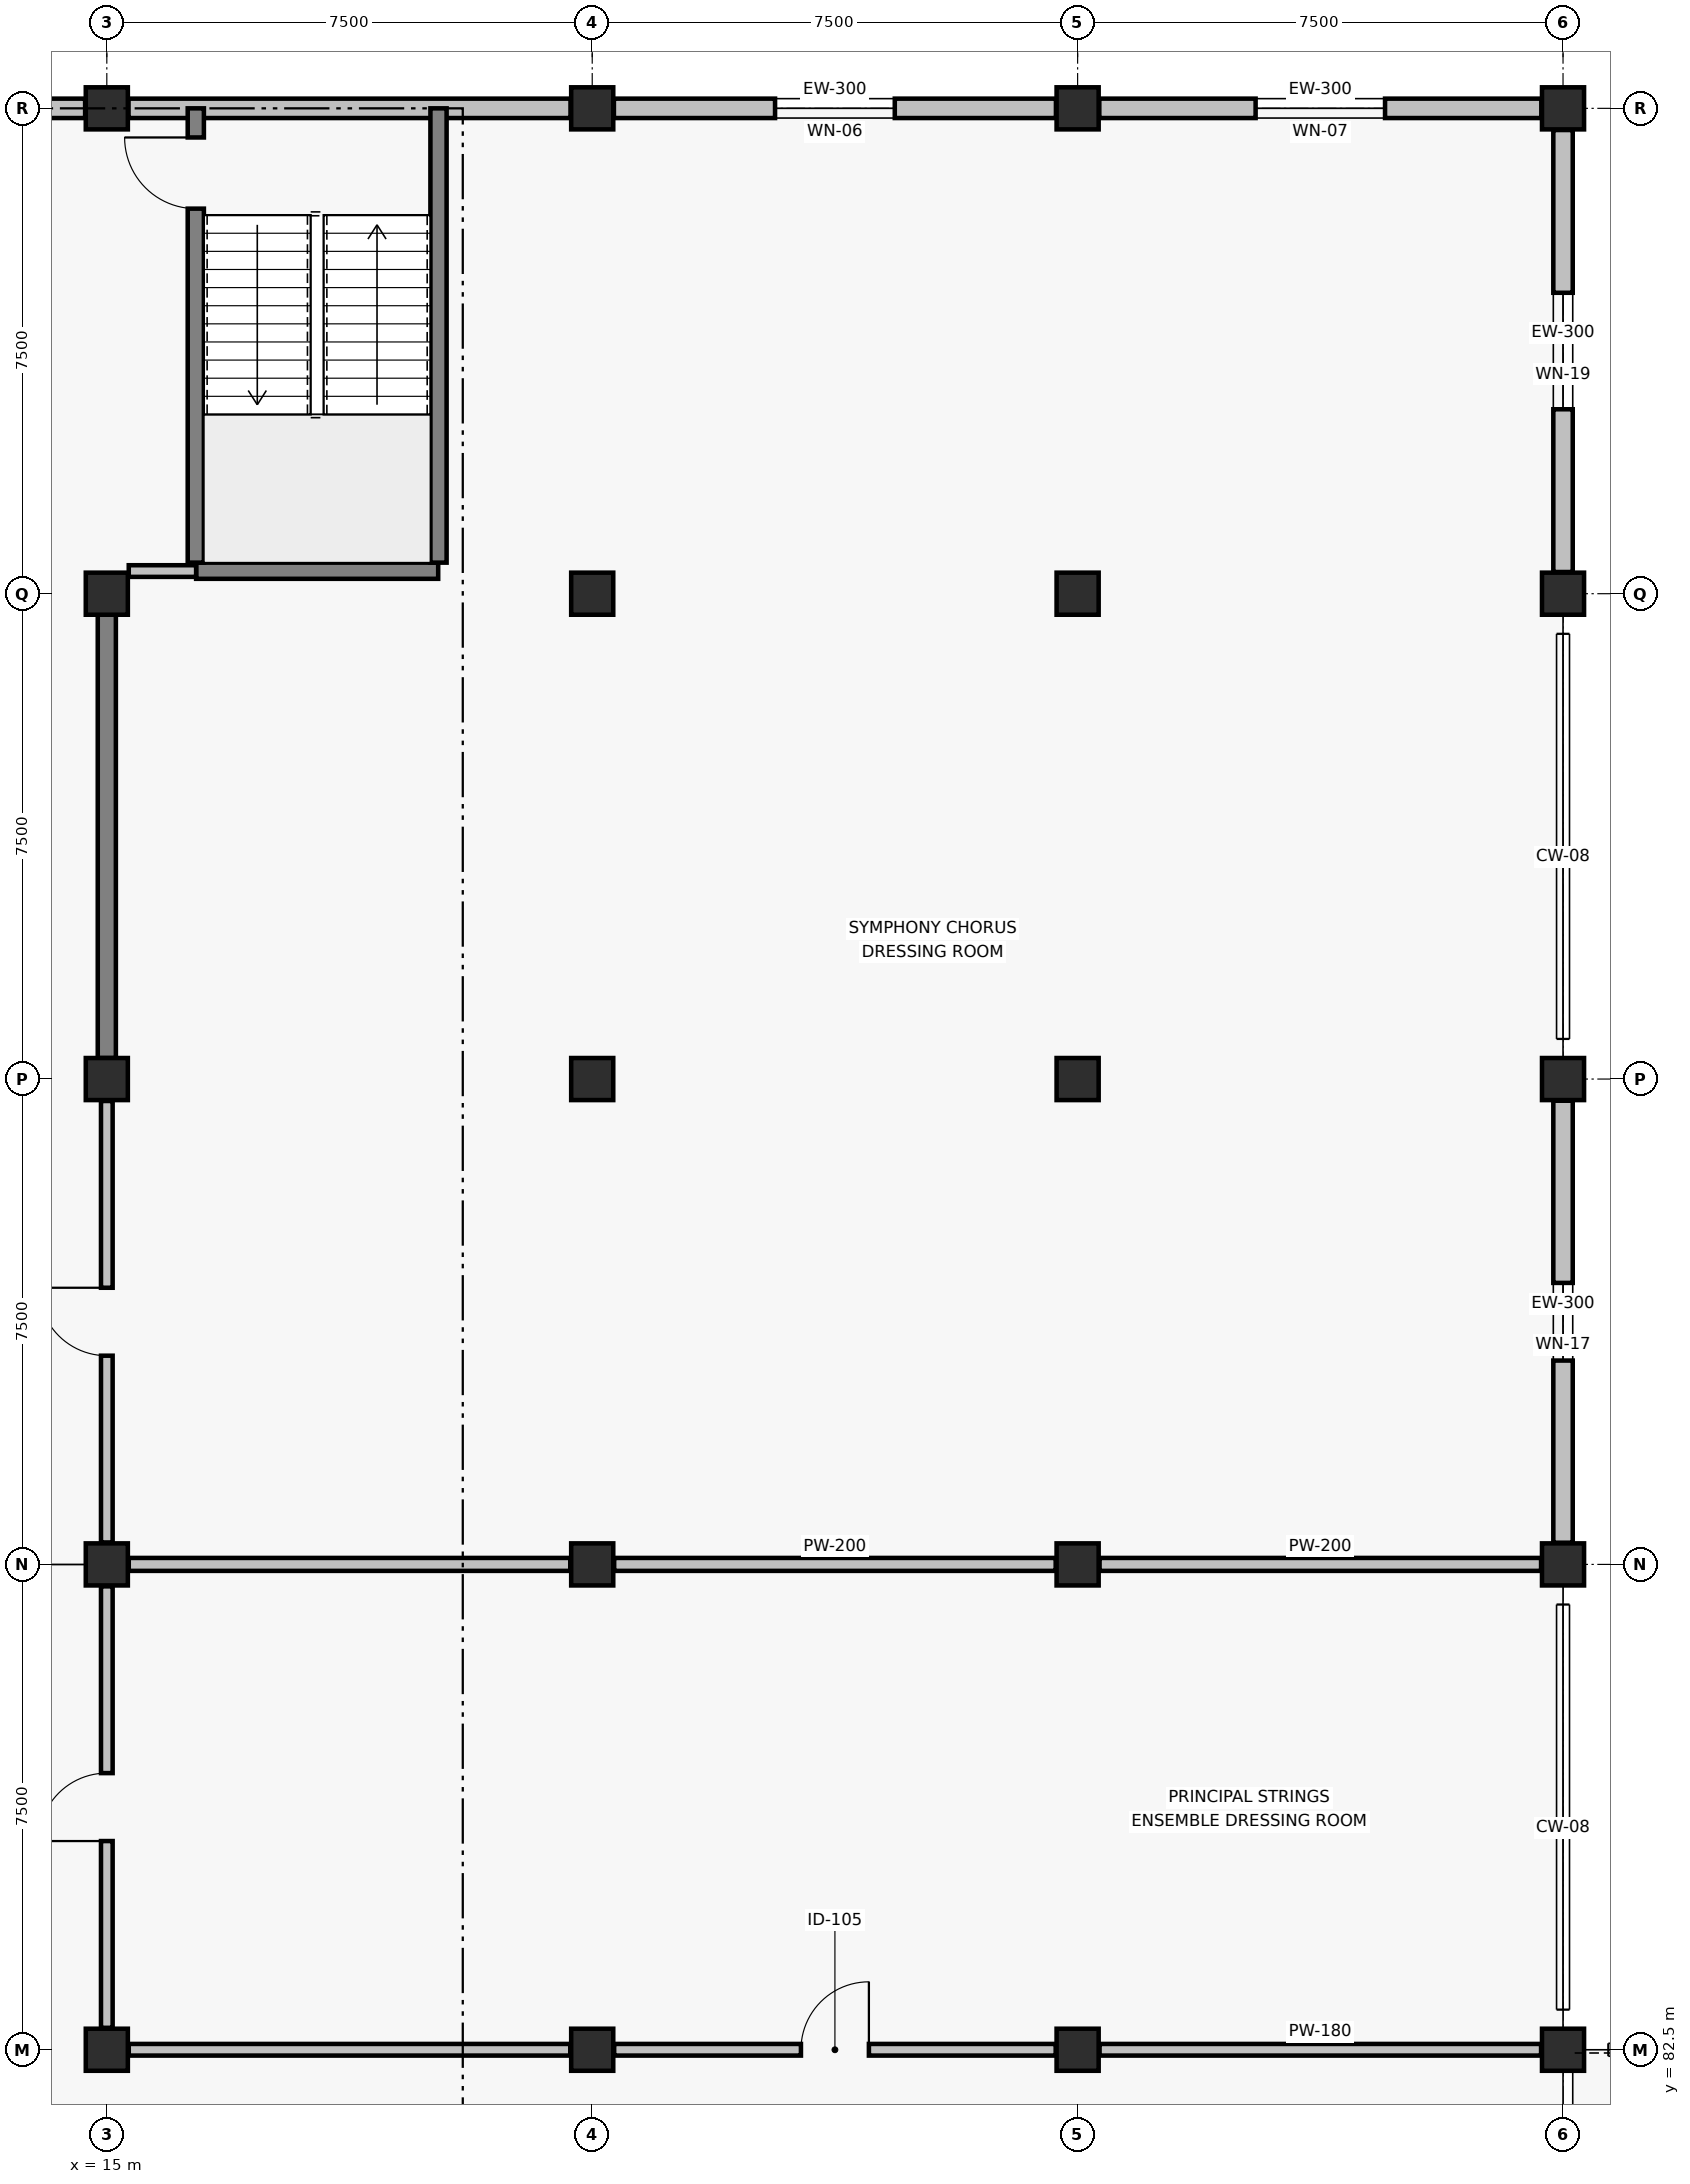
"""IFC4 building model, lengths in metres.
Left out: names, types, materials, properties, quantities, classifications, styles, units other than length and angle.
Written with IfcOpenShell. Run it as: python <this file> out.ifc"""

import sys

from ifc_helpers import new_model, si_unit, direction, frame, frame_2d, origin, origin_2d, place, context, subcontext, project, spatial, rectangle, extrude, element, fill, save


model = new_model("IFC4")
c1 = context("Model", 3, precision=1e-05, world=origin(), true_north=direction((0.0, 1.0)))
c2 = subcontext(c1, "Body", "Model", "MODEL_VIEW")
j1 = project(units=[si_unit("LENGTHUNIT", "METRE"), si_unit("PLANEANGLEUNIT", "RADIAN")], contexts=[c1])
p1 = place(None, origin())
s1 = spatial("IfcSite", under=j1, at=p1, CompositionType="ELEMENT")
p2 = place(p1, origin())
s2 = spatial("IfcBuilding", under=s1, at=p2, CompositionType="ELEMENT")
p3 = place(p2, frame((0.0, 0.0, 4.8)))
s3 = spatial("IfcBuildingStorey", under=s2, at=p3, CompositionType="ELEMENT", Elevation=4.8)
for number, where, z_axis, x_axis in (
    (1, (15.0, 82.5, 0.0), (0.0, 0.0, 1.0), (1.0, 0.0, 0.0)),
    (2, (15.0, 90.0, 0.0), (0.0, 0.0, 1.0), (1.0, 0.0, 0.0)),
    (3, (15.0, 97.5, 0.0), (0.0, 0.0, 1.0), (1.0, 0.0, 0.0)),
    (4, (15.0, 105.0, 0.0), (0.0, 0.0, 1.0), (1.0, 0.0, 0.0)),
    (5, (15.0, 112.5, 0.0), (0.0, 0.0, 1.0), (1.0, 0.0, 0.0)),
    (6, (22.5, 82.5, 0.0), (0.0, 0.0, 1.0), (1.0, 0.0, 0.0)),
    (7, (22.5, 90.0, 0.0), (0.0, 0.0, 1.0), (1.0, 0.0, 0.0)),
    (8, (22.5, 97.5, 0.0), (0.0, 0.0, 1.0), (1.0, 0.0, 0.0)),
    (9, (22.5, 105.0, 0.0), (0.0, 0.0, 1.0), (1.0, 0.0, 0.0)),
    (10, (22.5, 112.5, 0.0), (0.0, 0.0, 1.0), (1.0, 0.0, 0.0)),
    (11, (30.0, 82.5, 0.0), (0.0, 0.0, 1.0), (1.0, 0.0, 0.0)),
    (12, (30.0, 90.0, 0.0), (0.0, 0.0, 1.0), (1.0, 0.0, 0.0)),
    (13, (30.0, 97.5, 0.0), (0.0, 0.0, 1.0), (1.0, 0.0, 0.0)),
    (14, (30.0, 105.0, 0.0), (0.0, 0.0, 1.0), (1.0, 0.0, 0.0)),
    (15, (30.0, 112.5, 0.0), (0.0, 0.0, 1.0), (1.0, 0.0, 0.0)),
    (16, (37.5, 82.5, 0.0), (0.0, 0.0, 1.0), (1.0, 0.0, 0.0)),
    (17, (37.5, 90.0, 0.0), (0.0, 0.0, 1.0), (1.0, 0.0, 0.0)),
    (18, (37.5, 97.5, 0.0), (0.0, 0.0, 1.0), (1.0, 0.0, 0.0)),
    (19, (37.5, 105.0, 0.0), (0.0, 0.0, 1.0), (1.0, 0.0, 0.0)),
    (20, (37.5, 112.5, 0.0), (0.0, 0.0, 1.0), (1.0, 0.0, 0.0)),
):
    element("IfcColumn", number, at=place(p3, frame(where, z_axis=z_axis, x_axis=x_axis)), inside=s3, PredefinedType="COLUMN", context=c2, shape_type="SweptSolid", body=[
        extrude(rectangle(XDim=0.65, YDim=0.65, at=origin_2d()), origin(), (0.0, 0.0, 1.0), 4.2),
    ])
p4 = place(p3, frame((15.0, 97.825, 0.0), z_axis=(0.0, 0.0, 1.0), x_axis=(0.0, 1.0, 0.0)))
e21 = element("IfcWall", 21, at=p4, inside=s3, PredefinedType="SHEAR", context=c2, shape_type="SweptSolid", body=[
    extrude(rectangle(XDim=6.85, YDim=0.28, at=frame_2d((3.425, 0.0))), origin(), (0.0, 0.0, 1.0), 3.9),
])
p5 = place(p3, frame((8.12, 112.5, 0.0), z_axis=(0.0, 0.0, 1.0), x_axis=(1.0, 0.0, 0.0)))
e22 = element("IfcWall", 22, at=p5, inside=s3, PredefinedType="SOLIDWALL", context=c2, shape_type="SweptSolid", body=[
    extrude(rectangle(XDim=6.545, YDim=0.3, at=frame_2d((3.272, 0.0))), origin(), (0.0, 0.0, 1.0), 2.89),
])
p6 = place(p5, frame((2.355, 0.0, 0.6)))
e23 = element("IfcOpeningElement", 23, at=p6, cuts=e22, PredefinedType="OPENING", context=c2, shape_type="SweptSolid", body=[
    extrude(rectangle(XDim=1.55, YDim=1.8, at=frame_2d((0.775, 0.9))), frame((0.0, 0.16, 0.0), z_axis=(0.0, -1.0, 0.0), x_axis=(1.0, 0.0, 0.0)), (0.0, 0.0, 1.0), 0.32),
])
p7 = place(p3, frame((15.335, 112.5, 0.0), z_axis=(0.0, 0.0, 1.0), x_axis=(1.0, 0.0, 0.0)))
e24 = element("IfcWall", 24, at=p7, inside=s3, PredefinedType="SOLIDWALL", context=c2, shape_type="SweptSolid", body=[
    extrude(rectangle(XDim=6.83, YDim=0.3, at=frame_2d((3.415, 0.0))), origin(), (0.0, 0.0, 1.0), 2.89),
])
p8 = place(p3, frame((22.835, 112.5, 0.0), z_axis=(0.0, 0.0, 1.0), x_axis=(1.0, 0.0, 0.0)))
e25 = element("IfcWall", 25, at=p8, inside=s3, PredefinedType="SOLIDWALL", context=c2, shape_type="SweptSolid", body=[
    extrude(rectangle(XDim=6.83, YDim=0.3, at=frame_2d((3.415, 0.0))), origin(), (0.0, 0.0, 1.0), 3.14),
])
p9 = place(p8, frame((2.49, 0.0, 0.6)))
e26 = element("IfcOpeningElement", 26, at=p9, cuts=e25, PredefinedType="OPENING", context=c2, shape_type="SweptSolid", body=[
    extrude(rectangle(XDim=1.85, YDim=1.8, at=frame_2d((0.925, 0.9))), frame((0.0, 0.16, 0.0), z_axis=(0.0, -1.0, 0.0), x_axis=(1.0, 0.0, 0.0)), (0.0, 0.0, 1.0), 0.32),
])
p10 = place(p3, frame((30.335, 112.5, 0.0), z_axis=(0.0, 0.0, 1.0), x_axis=(1.0, 0.0, 0.0)))
e27 = element("IfcWall", 27, at=p10, inside=s3, PredefinedType="SOLIDWALL", context=c2, shape_type="SweptSolid", body=[
    extrude(rectangle(XDim=6.83, YDim=0.3, at=frame_2d((3.415, 0.0))), origin(), (0.0, 0.0, 1.0), 3.14),
])
p11 = place(p10, frame((2.415, 0.0, 0.6)))
e28 = element("IfcOpeningElement", 28, at=p11, cuts=e27, PredefinedType="OPENING", context=c2, shape_type="SweptSolid", body=[
    extrude(rectangle(XDim=2.0, YDim=1.45, at=frame_2d((1.0, 0.725))), frame((0.0, 0.16, 0.0), z_axis=(0.0, -1.0, 0.0), x_axis=(1.0, 0.0, 0.0)), (0.0, 0.0, 1.0), 0.32),
])
p12 = place(p3, frame((37.5, 90.335, 0.0), z_axis=(0.0, 0.0, 1.0), x_axis=(0.0, 1.0, 0.0)))
e29 = element("IfcWall", 29, at=p12, inside=s3, PredefinedType="SOLIDWALL", context=c2, shape_type="SweptSolid", body=[
    extrude(rectangle(XDim=6.83, YDim=0.3, at=frame_2d((3.415, 0.0))), origin(), (0.0, 0.0, 1.0), 2.84),
])
p13 = place(p12, frame((2.815, 0.0, 0.6)))
e30 = element("IfcOpeningElement", 30, at=p13, cuts=e29, PredefinedType="OPENING", context=c2, shape_type="SweptSolid", body=[
    extrude(rectangle(XDim=1.2, YDim=1.2, at=frame_2d((0.6, 0.6))), frame((0.0, 0.16, 0.0), z_axis=(0.0, -1.0, 0.0), x_axis=(1.0, 0.0, 0.0)), (0.0, 0.0, 1.0), 0.32),
])
p14 = place(p3, frame((37.5, 105.335, 0.0), z_axis=(0.0, 0.0, 1.0), x_axis=(0.0, 1.0, 0.0)))
e31 = element("IfcWall", 31, at=p14, inside=s3, PredefinedType="SOLIDWALL", context=c2, shape_type="SweptSolid", body=[
    extrude(rectangle(XDim=6.83, YDim=0.3, at=frame_2d((3.415, 0.0))), origin(), (0.0, 0.0, 1.0), 2.94),
])
p15 = place(p14, frame((2.515, 0.0, 0.6)))
e32 = element("IfcOpeningElement", 32, at=p15, cuts=e31, PredefinedType="OPENING", context=c2, shape_type="SweptSolid", body=[
    extrude(rectangle(XDim=1.8, YDim=1.2, at=frame_2d((0.9, 0.6))), frame((0.0, 0.16, 0.0), z_axis=(0.0, -1.0, 0.0), x_axis=(1.0, 0.0, 0.0)), (0.0, 0.0, 1.0), 0.32),
])
p16 = place(p3, frame((16.38, 105.355, 0.0), z_axis=(0.0, 0.0, 1.0), x_axis=(1.0, 0.0, 0.0)))
e33 = element("IfcWall", 33, at=p16, inside=s3, PredefinedType="SOLIDWALL", context=c2, shape_type="SweptSolid", body=[
    extrude(rectangle(XDim=3.74, YDim=0.25, at=frame_2d((1.87, 0.0))), origin(), (0.0, 0.0, 1.0), 3.92),
])
p17 = place(p3, frame((16.375, 105.48, 0.0), z_axis=(0.0, 0.0, 1.0), x_axis=(0.0, 1.0, 0.0)))
e34 = element("IfcWall", 34, at=p17, inside=s3, PredefinedType="SOLIDWALL", context=c2, shape_type="SweptSolid", body=[
    extrude(rectangle(XDim=7.02, YDim=0.25, at=frame_2d((3.51, 0.0))), origin(), (0.0, 0.0, 1.0), 3.92),
])
p18 = place(p17, frame((5.47, 0.0, 0.0)))
e35 = element("IfcOpeningElement", 35, at=p18, cuts=e34, PredefinedType="OPENING", context=c2, shape_type="SweptSolid", body=[
    extrude(rectangle(XDim=1.1, YDim=2.15, at=frame_2d((0.55, 1.075))), frame((0.0, 0.135, 0.0), z_axis=(0.0, -1.0, 0.0), x_axis=(1.0, 0.0, 0.0)), (0.0, 0.0, 1.0), 0.27),
])
p19 = place(p3, frame((20.125, 105.48, 0.0), z_axis=(0.0, 0.0, 1.0), x_axis=(0.0, 1.0, 0.0)))
e36 = element("IfcWall", 36, at=p19, inside=s3, PredefinedType="SOLIDWALL", context=c2, shape_type="SweptSolid", body=[
    extrude(rectangle(XDim=7.02, YDim=0.25, at=frame_2d((3.51, 0.0))), origin(), (0.0, 0.0, 1.0), 3.92),
])
p20 = place(p3, frame((15.339, 105.35, 0.0), z_axis=(0.0, 0.0, 1.0), x_axis=(1.0, 0.0, 0.0)))
e37 = element("IfcWall", 37, at=p20, inside=s3, PredefinedType="PARTITIONING", context=c2, shape_type="SweptSolid", body=[
    extrude(rectangle(XDim=1.041, YDim=0.18, at=frame_2d((0.521, 0.0))), origin(), (0.0, 0.0, 1.0), 2.89),
])
p21 = place(p3, frame((15.339, 82.5, 0.0), z_axis=(0.0, 0.0, 1.0), x_axis=(1.0, 0.0, 0.0)))
e38 = element("IfcWall", 38, at=p21, inside=s3, PredefinedType="PARTITIONING", context=c2, shape_type="SweptSolid", body=[
    extrude(rectangle(XDim=6.822, YDim=0.18, at=frame_2d((3.411, 0.0))), origin(), (0.0, 0.0, 1.0), 2.84),
])
p22 = place(p3, frame((22.839, 82.5, 0.0), z_axis=(0.0, 0.0, 1.0), x_axis=(1.0, 0.0, 0.0)))
e39 = element("IfcWall", 39, at=p22, inside=s3, PredefinedType="PARTITIONING", context=c2, shape_type="SweptSolid", body=[
    extrude(rectangle(XDim=6.822, YDim=0.18, at=frame_2d((3.411, 0.0))), origin(), (0.0, 0.0, 1.0), 2.84),
])
p23 = place(p22, frame((2.886, 0.0, 0.0)))
e40 = element("IfcOpeningElement", 40, at=p23, cuts=e39, PredefinedType="OPENING", context=c2, shape_type="SweptSolid", body=[
    extrude(rectangle(XDim=1.05, YDim=2.12, at=frame_2d((0.525, 1.06))), frame((0.0, 0.1, 0.0), z_axis=(0.0, -1.0, 0.0), x_axis=(1.0, 0.0, 0.0)), (0.0, 0.0, 1.0), 0.2),
])
p24 = place(p3, frame((30.339, 82.5, 0.0), z_axis=(0.0, 0.0, 1.0), x_axis=(1.0, 0.0, 0.0)))
e41 = element("IfcWall", 41, at=p24, inside=s3, PredefinedType="PARTITIONING", context=c2, shape_type="SweptSolid", body=[
    extrude(rectangle(XDim=6.822, YDim=0.18, at=frame_2d((3.411, 0.0))), origin(), (0.0, 0.0, 1.0), 3.04),
])
p25 = place(p3, frame((15.339, 90.0, 0.0), z_axis=(0.0, 0.0, 1.0), x_axis=(1.0, 0.0, 0.0)))
e42 = element("IfcWall", 42, at=p25, inside=s3, PredefinedType="PARTITIONING", context=c2, shape_type="SweptSolid", body=[
    extrude(rectangle(XDim=6.822, YDim=0.2, at=frame_2d((3.411, 0.0))), origin(), (0.0, 0.0, 1.0), 2.89),
])
p26 = place(p3, frame((22.839, 90.0, 0.0), z_axis=(0.0, 0.0, 1.0), x_axis=(1.0, 0.0, 0.0)))
e43 = element("IfcWall", 43, at=p26, inside=s3, PredefinedType="PARTITIONING", context=c2, shape_type="SweptSolid", body=[
    extrude(rectangle(XDim=6.822, YDim=0.2, at=frame_2d((3.411, 0.0))), origin(), (0.0, 0.0, 1.0), 2.94),
])
p27 = place(p3, frame((30.339, 90.0, 0.0), z_axis=(0.0, 0.0, 1.0), x_axis=(1.0, 0.0, 0.0)))
e44 = element("IfcWall", 44, at=p27, inside=s3, PredefinedType="PARTITIONING", context=c2, shape_type="SweptSolid", body=[
    extrude(rectangle(XDim=6.822, YDim=0.2, at=frame_2d((3.411, 0.0))), origin(), (0.0, 0.0, 1.0), 2.99),
])
p28 = place(p3, frame((15.0, 82.839, 0.0), z_axis=(0.0, 0.0, 1.0), x_axis=(0.0, 1.0, 0.0)))
e45 = element("IfcWall", 45, at=p28, inside=s3, PredefinedType="PARTITIONING", context=c2, shape_type="SweptSolid", body=[
    extrude(rectangle(XDim=6.822, YDim=0.18, at=frame_2d((3.411, 0.0))), origin(), (0.0, 0.0, 1.0), 2.84),
])
p29 = place(p28, frame((2.886, 0.0, 0.0)))
e46 = element("IfcOpeningElement", 46, at=p29, cuts=e45, PredefinedType="OPENING", context=c2, shape_type="SweptSolid", body=[
    extrude(rectangle(XDim=1.05, YDim=2.12, at=frame_2d((0.525, 1.06))), frame((0.0, 0.1, 0.0), z_axis=(0.0, -1.0, 0.0), x_axis=(1.0, 0.0, 0.0)), (0.0, 0.0, 1.0), 0.2),
])
p30 = place(p3, frame((15.0, 90.339, 0.0), z_axis=(0.0, 0.0, 1.0), x_axis=(0.0, 1.0, 0.0)))
e47 = element("IfcWall", 47, at=p30, inside=s3, PredefinedType="PARTITIONING", context=c2, shape_type="SweptSolid", body=[
    extrude(rectangle(XDim=6.822, YDim=0.18, at=frame_2d((3.411, 0.0))), origin(), (0.0, 0.0, 1.0), 2.89),
])
p31 = place(p30, frame((2.886, 0.0, 0.0)))
e48 = element("IfcOpeningElement", 48, at=p31, cuts=e47, PredefinedType="OPENING", context=c2, shape_type="SweptSolid", body=[
    extrude(rectangle(XDim=1.05, YDim=2.12, at=frame_2d((0.525, 1.06))), frame((0.0, 0.1, 0.0), z_axis=(0.0, -1.0, 0.0), x_axis=(1.0, 0.0, 0.0)), (0.0, 0.0, 1.0), 0.2),
])
p32 = place(p9, origin())
e49 = element("IfcWindow", 49, at=p32, inside=s3, PartitioningType="SINGLE_PANEL", PredefinedType="WINDOW", context=c2, shape_type="SweptSolid", body=[
    extrude(rectangle(XDim=1.85, YDim=1.8, at=frame_2d((0.925, 0.9))), frame((0.0, 0.03, 0.0), z_axis=(0.0, -1.0, 0.0), x_axis=(1.0, 0.0, 0.0)), (0.0, 0.0, 1.0), 0.06),
])
fill(e26, e49)
p33 = place(p11, origin())
e50 = element("IfcWindow", 50, at=p33, inside=s3, PartitioningType="SINGLE_PANEL", PredefinedType="WINDOW", context=c2, shape_type="SweptSolid", body=[
    extrude(rectangle(XDim=2.0, YDim=1.45, at=frame_2d((1.0, 0.725))), frame((0.0, 0.03, 0.0), z_axis=(0.0, -1.0, 0.0), x_axis=(1.0, 0.0, 0.0)), (0.0, 0.0, 1.0), 0.06),
])
fill(e28, e50)
p34 = place(p13, origin())
e51 = element("IfcWindow", 51, at=p34, inside=s3, PartitioningType="SINGLE_PANEL", PredefinedType="WINDOW", context=c2, shape_type="SweptSolid", body=[
    extrude(rectangle(XDim=1.2, YDim=1.2, at=frame_2d((0.6, 0.6))), frame((0.0, 0.03, 0.0), z_axis=(0.0, -1.0, 0.0), x_axis=(1.0, 0.0, 0.0)), (0.0, 0.0, 1.0), 0.06),
])
fill(e30, e51)
p35 = place(p15, origin())
e52 = element("IfcWindow", 52, at=p35, inside=s3, PartitioningType="SINGLE_PANEL", PredefinedType="WINDOW", context=c2, shape_type="SweptSolid", body=[
    extrude(rectangle(XDim=1.8, YDim=1.2, at=frame_2d((0.9, 0.6))), frame((0.0, 0.03, 0.0), z_axis=(0.0, -1.0, 0.0), x_axis=(1.0, 0.0, 0.0)), (0.0, 0.0, 1.0), 0.06),
])
fill(e32, e52)
p36 = place(p18, origin())
e53 = element("IfcDoor", 53, at=p36, inside=s3, OperationType="SINGLE_SWING_RIGHT", PredefinedType="DOOR", context=c2, shape_type="SweptSolid", body=[
    extrude(rectangle(XDim=1.1, YDim=2.15, at=frame_2d((0.55, 1.075))), frame((0.0, 0.025, 0.0), z_axis=(0.0, -1.0, 0.0), x_axis=(1.0, 0.0, 0.0)), (0.0, 0.0, 1.0), 0.05),
])
fill(e35, e53)
p37 = place(p23, origin())
e54 = element("IfcDoor", 54, at=p37, inside=s3, OperationType="SINGLE_SWING_RIGHT", PredefinedType="DOOR", context=c2, shape_type="SweptSolid", body=[
    extrude(rectangle(XDim=1.05, YDim=2.12, at=frame_2d((0.525, 1.06))), frame((0.0, 0.025, 0.0), z_axis=(0.0, -1.0, 0.0), x_axis=(1.0, 0.0, 0.0)), (0.0, 0.0, 1.0), 0.05),
])
fill(e40, e54)
p38 = place(p29, origin())
e55 = element("IfcDoor", 55, at=p38, inside=s3, OperationType="SINGLE_SWING_LEFT", PredefinedType="DOOR", context=c2, shape_type="SweptSolid", body=[
    extrude(rectangle(XDim=1.05, YDim=2.12, at=frame_2d((0.525, 1.06))), frame((0.0, 0.025, 0.0), z_axis=(0.0, -1.0, 0.0), x_axis=(1.0, 0.0, 0.0)), (0.0, 0.0, 1.0), 0.05),
])
fill(e46, e55)
p39 = place(p31, origin())
e56 = element("IfcDoor", 56, at=p39, inside=s3, OperationType="SINGLE_SWING_RIGHT", PredefinedType="DOOR", context=c2, shape_type="SweptSolid", body=[
    extrude(rectangle(XDim=1.05, YDim=2.12, at=frame_2d((0.525, 1.06))), frame((0.0, 0.025, 0.0), z_axis=(0.0, -1.0, 0.0), x_axis=(1.0, 0.0, 0.0)), (0.0, 0.0, 1.0), 0.05),
])
fill(e48, e56)
save(model, sys.argv[1])
